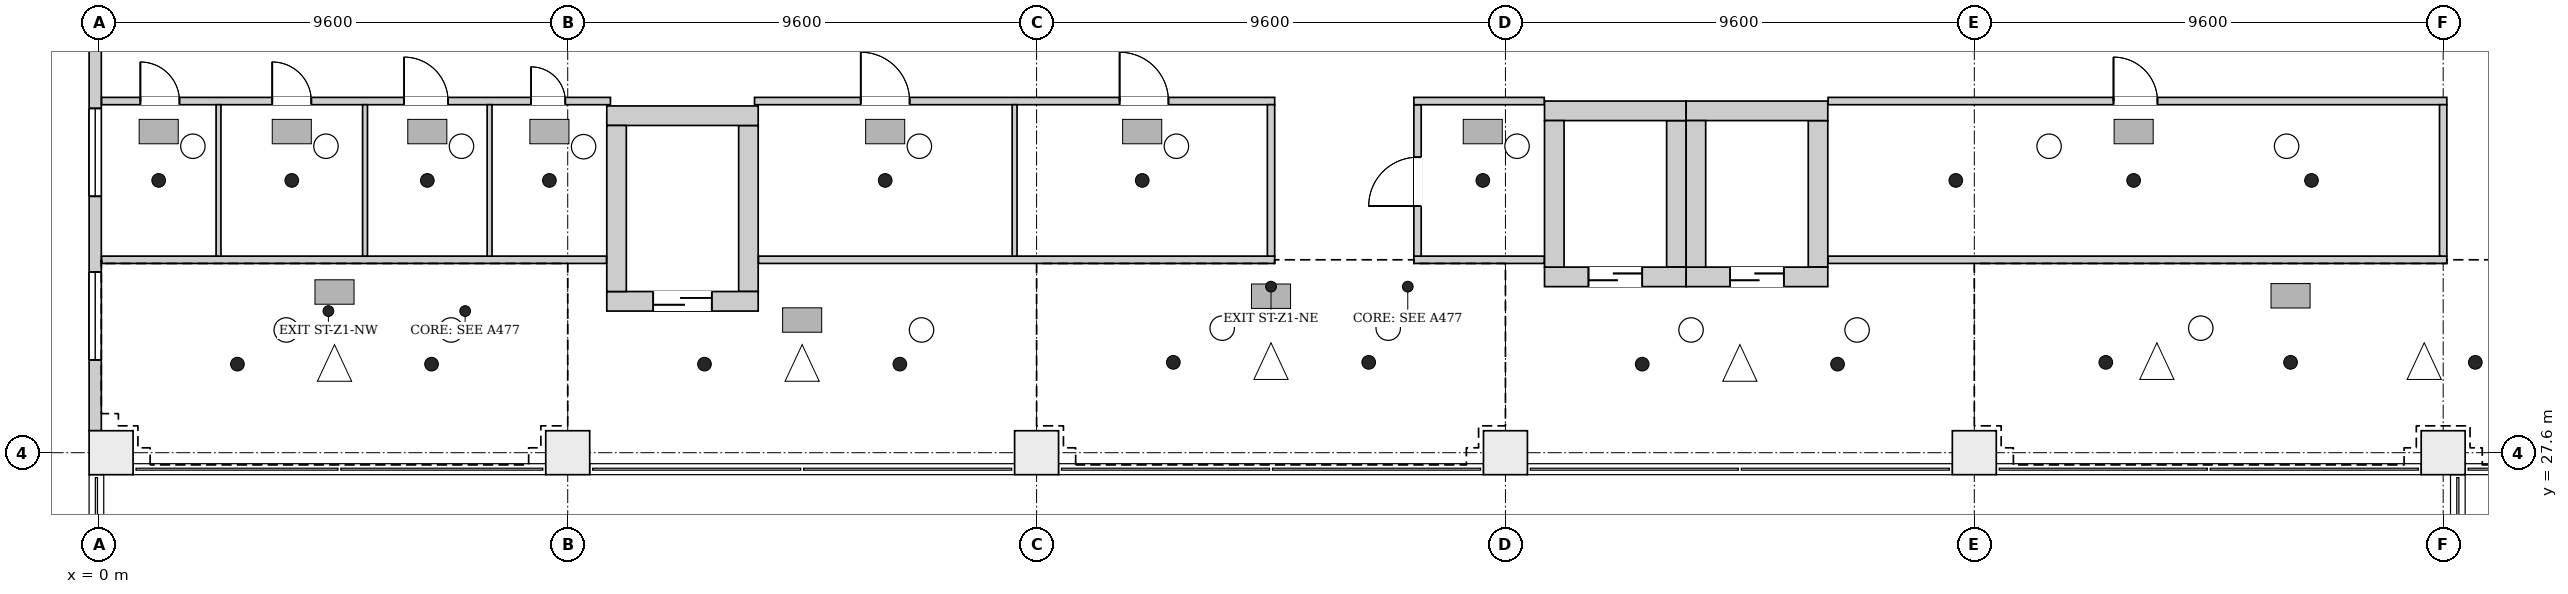
"""IFC4 building model, lengths in metres.
Left out: names, types, materials, properties, quantities, classifications, styles, units other than length and angle.
Written with IfcOpenShell. Run it as: python <this file> out.ifc"""

import sys

from ifc_helpers import new_model, si_unit, direction, frame, frame_2d, origin, origin_2d, place, context, subcontext, project, spatial, rectangle, extrude, element, fill, save


model = new_model("IFC4")
c1 = context("Model", 3, precision=1e-05, world=origin(), true_north=direction((0.0, 1.0)))
c2 = subcontext(c1, "Body", "Model", "MODEL_VIEW")
j1 = project(units=[si_unit("LENGTHUNIT", "METRE"), si_unit("PLANEANGLEUNIT", "RADIAN")], contexts=[c1])
p1 = place(None, origin())
s1 = spatial("IfcSite", under=j1, at=p1, CompositionType="ELEMENT")
p2 = place(p1, origin())
s2 = spatial("IfcBuilding", under=s1, at=p2, CompositionType="ELEMENT")
p3 = place(p2, frame((0.0, 0.0, 52.9)))
s3 = spatial("IfcBuildingStorey", under=s2, at=p3, CompositionType="ELEMENT", Elevation=52.9)
p4 = place(p3, frame((10.4, 30.7, 0.0), z_axis=(0.0, 0.0, 1.0), x_axis=(1.0, 0.0, 0.0)))
e1 = element("IfcWall", 1, at=p4, inside=s3, PredefinedType="SHEAR", context=c2, shape_type="SweptSolid", body=[
    extrude(rectangle(XDim=3.1, YDim=0.4, at=frame_2d((1.55, 0.0))), origin(), (0.0, 0.0, 1.0), 4.2),
])
p5 = place(p4, frame((0.95, 0.0, 0.0)))
e2 = element("IfcOpeningElement", 2, at=p5, cuts=e1, PredefinedType="OPENING", context=c2, shape_type="SweptSolid", body=[
    extrude(rectangle(XDim=1.2, YDim=2.1, at=frame_2d((0.6, 1.05))), frame((0.0, 0.21, 0.0), z_axis=(0.0, -1.0, 0.0), x_axis=(1.0, 0.0, 0.0)), (0.0, 0.0, 1.0), 0.42),
])
p6 = place(p3, frame((10.4, 34.5, 0.0), z_axis=(0.0, 0.0, 1.0), x_axis=(1.0, 0.0, 0.0)))
e3 = element("IfcWall", 3, at=p6, inside=s3, PredefinedType="SHEAR", context=c2, shape_type="SweptSolid", body=[
    extrude(rectangle(XDim=3.1, YDim=0.4, at=frame_2d((1.55, 0.0))), origin(), (0.0, 0.0, 1.0), 4.2),
])
for number, where, z_axis, x_axis in (
    (4, (10.6, 30.9, 0.0), (0.0, 0.0, 1.0), (0.0, 1.0, 0.0)),
    (5, (13.3, 30.9, 0.0), (0.0, 0.0, 1.0), (0.0, 1.0, 0.0)),
):
    element("IfcWall", number, at=place(p3, frame(where, z_axis=z_axis, x_axis=x_axis)), inside=s3, PredefinedType="SHEAR", context=c2, shape_type="SweptSolid", body=[
        extrude(rectangle(XDim=3.4, YDim=0.4, at=frame_2d((1.7, 0.0))), origin(), (0.0, 0.0, 1.0), 4.2),
    ])
p7 = place(p3, frame((29.6, 31.2, 0.0), z_axis=(0.0, 0.0, 1.0), x_axis=(1.0, 0.0, 0.0)))
e6 = element("IfcWall", 6, at=p7, inside=s3, PredefinedType="SHEAR", context=c2, shape_type="SweptSolid", body=[
    extrude(rectangle(XDim=2.9, YDim=0.4, at=frame_2d((1.45, 0.0))), origin(), (0.0, 0.0, 1.0), 4.2),
])
p8 = place(p7, frame((0.9, 0.0, 0.0)))
e7 = element("IfcOpeningElement", 7, at=p8, cuts=e6, PredefinedType="OPENING", context=c2, shape_type="SweptSolid", body=[
    extrude(rectangle(XDim=1.1, YDim=2.1, at=frame_2d((0.55, 1.05))), frame((0.0, 0.21, 0.0), z_axis=(0.0, -1.0, 0.0), x_axis=(1.0, 0.0, 0.0)), (0.0, 0.0, 1.0), 0.42),
])
p9 = place(p3, frame((29.6, 34.6, 0.0), z_axis=(0.0, 0.0, 1.0), x_axis=(1.0, 0.0, 0.0)))
e8 = element("IfcWall", 8, at=p9, inside=s3, PredefinedType="SHEAR", context=c2, shape_type="SweptSolid", body=[
    extrude(rectangle(XDim=2.9, YDim=0.4, at=frame_2d((1.45, 0.0))), origin(), (0.0, 0.0, 1.0), 4.2),
])
for number, where, z_axis, x_axis in (
    (9, (29.8, 31.4, 0.0), (0.0, 0.0, 1.0), (0.0, 1.0, 0.0)),
    (10, (32.3, 31.4, 0.0), (0.0, 0.0, 1.0), (0.0, 1.0, 0.0)),
):
    element("IfcWall", number, at=place(p3, frame(where, z_axis=z_axis, x_axis=x_axis)), inside=s3, PredefinedType="SHEAR", context=c2, shape_type="SweptSolid", body=[
        extrude(rectangle(XDim=3.0, YDim=0.4, at=frame_2d((1.5, 0.0))), origin(), (0.0, 0.0, 1.0), 4.2),
    ])
p10 = place(p3, frame((32.5, 31.2, 0.0), z_axis=(0.0, 0.0, 1.0), x_axis=(1.0, 0.0, 0.0)))
e11 = element("IfcWall", 11, at=p10, inside=s3, PredefinedType="SHEAR", context=c2, shape_type="SweptSolid", body=[
    extrude(rectangle(XDim=2.9, YDim=0.4, at=frame_2d((1.45, 0.0))), origin(), (0.0, 0.0, 1.0), 4.2),
])
p11 = place(p10, frame((0.9, 0.0, 0.0)))
e12 = element("IfcOpeningElement", 12, at=p11, cuts=e11, PredefinedType="OPENING", context=c2, shape_type="SweptSolid", body=[
    extrude(rectangle(XDim=1.1, YDim=2.1, at=frame_2d((0.55, 1.05))), frame((0.0, 0.21, 0.0), z_axis=(0.0, -1.0, 0.0), x_axis=(1.0, 0.0, 0.0)), (0.0, 0.0, 1.0), 0.42),
])
p12 = place(p3, frame((32.5, 34.6, 0.0), z_axis=(0.0, 0.0, 1.0), x_axis=(1.0, 0.0, 0.0)))
e13 = element("IfcWall", 13, at=p12, inside=s3, PredefinedType="SHEAR", context=c2, shape_type="SweptSolid", body=[
    extrude(rectangle(XDim=2.9, YDim=0.4, at=frame_2d((1.45, 0.0))), origin(), (0.0, 0.0, 1.0), 4.2),
])
for number, where, z_axis, x_axis in (
    (14, (32.7, 31.4, 0.0), (0.0, 0.0, 1.0), (0.0, 1.0, 0.0)),
    (15, (35.2, 31.4, 0.0), (0.0, 0.0, 1.0), (0.0, 1.0, 0.0)),
):
    element("IfcWall", number, at=place(p3, frame(where, z_axis=z_axis, x_axis=x_axis)), inside=s3, PredefinedType="SHEAR", context=c2, shape_type="SweptSolid", body=[
        extrude(rectangle(XDim=3.0, YDim=0.4, at=frame_2d((1.5, 0.0))), origin(), (0.0, 0.0, 1.0), 4.2),
    ])
for number, where, z_axis, x_axis in (
    (16, (0.25, 27.6, 0.0), (0.0, 0.0, 1.0), (1.0, 0.0, 0.0)),
    (17, (9.6, 27.6, 0.0), (0.0, 0.0, 1.0), (1.0, 0.0, 0.0)),
    (18, (19.2, 27.6, 0.0), (0.0, 0.0, 1.0), (1.0, 0.0, 0.0)),
    (19, (28.8, 27.6, 0.0), (0.0, 0.0, 1.0), (1.0, 0.0, 0.0)),
    (20, (38.4, 27.6, 0.0), (0.0, 0.0, 1.0), (1.0, 0.0, 0.0)),
    (21, (48.0, 27.6, 0.0), (0.0, 0.0, 1.0), (1.0, 0.0, 0.0)),
):
    element("IfcColumn", number, at=place(p3, frame(where, z_axis=z_axis, x_axis=x_axis)), inside=s3, PredefinedType="COLUMN", context=c2, shape_type="SweptSolid", body=[
        extrude(rectangle(XDim=0.9, YDim=0.9, at=origin_2d()), origin(), (0.0, 0.0, 1.0), 4.2),
    ])
p13 = place(p3, frame((-0.074, 36.35, 0.0), z_axis=(0.0, 0.0, 1.0), x_axis=(0.0, -1.0, 0.0)))
e22 = element("IfcWall", 22, at=p13, inside=s3, PredefinedType="ELEMENTEDWALL", context=c2, shape_type="SweptSolid", body=[
    extrude(rectangle(XDim=8.3, YDim=0.25, at=frame_2d((4.15, 0.0))), origin(), (0.0, 0.0, 1.0), 3.9),
])
p14 = place(p13, frame((5.05, 0.0, 0.9)))
e23 = element("IfcOpeningElement", 23, at=p14, cuts=e22, PredefinedType="OPENING", context=c2, shape_type="SweptSolid", body=[
    extrude(rectangle(XDim=1.8, YDim=2.6, at=frame_2d((0.9, 1.3))), frame((0.0, 0.135, 0.0), z_axis=(0.0, -1.0, 0.0), x_axis=(1.0, 0.0, 0.0)), (0.0, 0.0, 1.0), 0.27),
])
p15 = place(p13, frame((1.7, 0.0, 0.9)))
e24 = element("IfcOpeningElement", 24, at=p15, cuts=e22, PredefinedType="OPENING", context=c2, shape_type="SweptSolid", body=[
    extrude(rectangle(XDim=1.8, YDim=2.6, at=frame_2d((0.9, 1.3))), frame((0.0, 0.135, 0.0), z_axis=(0.0, -1.0, 0.0), x_axis=(1.0, 0.0, 0.0)), (0.0, 0.0, 1.0), 0.27),
])
p16 = place(p3, frame((0.056, 31.55, 0.0), z_axis=(0.0, 0.0, 1.0), x_axis=(1.0, 0.0, 0.0)))
e25 = element("IfcWall", 25, at=p16, inside=s3, PredefinedType="PARTITIONING", context=c2, shape_type="SweptSolid", body=[
    extrude(rectangle(XDim=10.338, YDim=0.15, at=frame_2d((5.169, 0.0))), origin(), (0.0, 0.0, 1.0), 3.9),
])
p17 = place(p3, frame((0.056, 34.8, 0.0), z_axis=(0.0, 0.0, 1.0), x_axis=(1.0, 0.0, 0.0)))
e26 = element("IfcWall", 26, at=p17, inside=s3, PredefinedType="PARTITIONING", context=c2, shape_type="SweptSolid", body=[
    extrude(rectangle(XDim=10.419, YDim=0.15, at=frame_2d((5.209, 0.0))), origin(), (0.0, 0.0, 1.0), 3.9),
])
p18 = place(p17, frame((0.794, 0.0, 0.0)))
e27 = element("IfcOpeningElement", 27, at=p18, cuts=e26, PredefinedType="OPENING", context=c2, shape_type="SweptSolid", body=[
    extrude(rectangle(XDim=0.8, YDim=2.1, at=frame_2d((0.4, 1.05))), frame((0.0, 0.085, 0.0), z_axis=(0.0, -1.0, 0.0), x_axis=(1.0, 0.0, 0.0)), (0.0, 0.0, 1.0), 0.17),
])
p19 = place(p17, frame((3.494, 0.0, 0.0)))
e28 = element("IfcOpeningElement", 28, at=p19, cuts=e26, PredefinedType="OPENING", context=c2, shape_type="SweptSolid", body=[
    extrude(rectangle(XDim=0.8, YDim=2.1, at=frame_2d((0.4, 1.05))), frame((0.0, 0.085, 0.0), z_axis=(0.0, -1.0, 0.0), x_axis=(1.0, 0.0, 0.0)), (0.0, 0.0, 1.0), 0.17),
])
p20 = place(p17, frame((6.194, 0.0, 0.0)))
e29 = element("IfcOpeningElement", 29, at=p20, cuts=e26, PredefinedType="OPENING", context=c2, shape_type="SweptSolid", body=[
    extrude(rectangle(XDim=0.9, YDim=2.1, at=frame_2d((0.45, 1.05))), frame((0.0, 0.085, 0.0), z_axis=(0.0, -1.0, 0.0), x_axis=(1.0, 0.0, 0.0)), (0.0, 0.0, 1.0), 0.17),
])
p21 = place(p17, frame((8.794, 0.0, 0.0)))
e30 = element("IfcOpeningElement", 30, at=p21, cuts=e26, PredefinedType="OPENING", context=c2, shape_type="SweptSolid", body=[
    extrude(rectangle(XDim=0.7, YDim=2.1, at=frame_2d((0.35, 1.05))), frame((0.0, 0.085, 0.0), z_axis=(0.0, -1.0, 0.0), x_axis=(1.0, 0.0, 0.0)), (0.0, 0.0, 1.0), 0.17),
])
for number, where, z_axis, x_axis in (
    (31, (2.45, 31.625, 0.0), (0.0, 0.0, 1.0), (0.0, 1.0, 0.0)),
    (32, (5.45, 31.625, 0.0), (0.0, 0.0, 1.0), (0.0, 1.0, 0.0)),
    (33, (8.0, 31.625, 0.0), (0.0, 0.0, 1.0), (0.0, 1.0, 0.0)),
):
    element("IfcWall", number, at=place(p3, frame(where, z_axis=z_axis, x_axis=x_axis)), inside=s3, PredefinedType="PARTITIONING", context=c2, shape_type="SweptSolid", body=[
        extrude(rectangle(XDim=3.1, YDim=0.1, at=frame_2d((1.55, 0.0))), origin(), (0.0, 0.0, 1.0), 3.9),
    ])
p22 = place(p3, frame((13.425, 34.8, 0.0), z_axis=(0.0, 0.0, 1.0), x_axis=(1.0, 0.0, 0.0)))
e34 = element("IfcWall", 34, at=p22, inside=s3, PredefinedType="PARTITIONING", context=c2, shape_type="SweptSolid", body=[
    extrude(rectangle(XDim=10.65, YDim=0.15, at=frame_2d((5.325, 0.0))), origin(), (0.0, 0.0, 1.0), 3.9),
])
p23 = place(p22, frame((2.175, 0.0, 0.0)))
e35 = element("IfcOpeningElement", 35, at=p23, cuts=e34, PredefinedType="OPENING", context=c2, shape_type="SweptSolid", body=[
    extrude(rectangle(XDim=1.0, YDim=2.1, at=frame_2d((0.5, 1.05))), frame((0.0, 0.085, 0.0), z_axis=(0.0, -1.0, 0.0), x_axis=(1.0, 0.0, 0.0)), (0.0, 0.0, 1.0), 0.17),
])
p24 = place(p22, frame((7.475, 0.0, 0.0)))
e36 = element("IfcOpeningElement", 36, at=p24, cuts=e34, PredefinedType="OPENING", context=c2, shape_type="SweptSolid", body=[
    extrude(rectangle(XDim=1.0, YDim=2.1, at=frame_2d((0.5, 1.05))), frame((0.0, 0.085, 0.0), z_axis=(0.0, -1.0, 0.0), x_axis=(1.0, 0.0, 0.0)), (0.0, 0.0, 1.0), 0.17),
])
p25 = place(p3, frame((13.506, 31.55, 0.0), z_axis=(0.0, 0.0, 1.0), x_axis=(1.0, 0.0, 0.0)))
e37 = element("IfcWall", 37, at=p25, inside=s3, PredefinedType="PARTITIONING", context=c2, shape_type="SweptSolid", body=[
    extrude(rectangle(XDim=10.569, YDim=0.15, at=frame_2d((5.284, 0.0))), origin(), (0.0, 0.0, 1.0), 3.9),
])
p26 = place(p3, frame((18.75, 31.625, 0.0), z_axis=(0.0, 0.0, 1.0), x_axis=(0.0, 1.0, 0.0)))
e38 = element("IfcWall", 38, at=p26, inside=s3, PredefinedType="PARTITIONING", context=c2, shape_type="SweptSolid", body=[
    extrude(rectangle(XDim=3.1, YDim=0.1, at=frame_2d((1.55, 0.0))), origin(), (0.0, 0.0, 1.0), 3.9),
])
p27 = place(p3, frame((24.0, 31.625, 0.0), z_axis=(0.0, 0.0, 1.0), x_axis=(0.0, 1.0, 0.0)))
e39 = element("IfcWall", 39, at=p27, inside=s3, PredefinedType="PARTITIONING", context=c2, shape_type="SweptSolid", body=[
    extrude(rectangle(XDim=3.1, YDim=0.15, at=frame_2d((1.55, 0.0))), origin(), (0.0, 0.0, 1.0), 3.9),
])
p28 = place(p3, frame((26.925, 31.55, 0.0), z_axis=(0.0, 0.0, 1.0), x_axis=(1.0, 0.0, 0.0)))
e40 = element("IfcWall", 40, at=p28, inside=s3, PredefinedType="PARTITIONING", context=c2, shape_type="SweptSolid", body=[
    extrude(rectangle(XDim=2.669, YDim=0.15, at=frame_2d((1.334, 0.0))), origin(), (0.0, 0.0, 1.0), 3.9),
])
p29 = place(p3, frame((27.0, 31.625, 0.0), z_axis=(0.0, 0.0, 1.0), x_axis=(0.0, 1.0, 0.0)))
e41 = element("IfcWall", 41, at=p29, inside=s3, PredefinedType="PARTITIONING", context=c2, shape_type="SweptSolid", body=[
    extrude(rectangle(XDim=3.1, YDim=0.15, at=frame_2d((1.55, 0.0))), origin(), (0.0, 0.0, 1.0), 3.9),
])
p30 = place(p29, frame((1.025, 0.0, 0.0)))
e42 = element("IfcOpeningElement", 42, at=p30, cuts=e41, PredefinedType="OPENING", context=c2, shape_type="SweptSolid", body=[
    extrude(rectangle(XDim=1.0, YDim=2.1, at=frame_2d((0.5, 1.05))), frame((0.0, 0.085, 0.0), z_axis=(0.0, -1.0, 0.0), x_axis=(1.0, 0.0, 0.0)), (0.0, 0.0, 1.0), 0.17),
])
p31 = place(p3, frame((26.925, 34.8, 0.0), z_axis=(0.0, 0.0, 1.0), x_axis=(1.0, 0.0, 0.0)))
e43 = element("IfcWall", 43, at=p31, inside=s3, PredefinedType="PARTITIONING", context=c2, shape_type="SweptSolid", body=[
    extrude(rectangle(XDim=2.669, YDim=0.15, at=frame_2d((1.334, 0.0))), origin(), (0.0, 0.0, 1.0), 3.9),
])
p32 = place(p3, frame((35.406, 31.55, 0.0), z_axis=(0.0, 0.0, 1.0), x_axis=(1.0, 0.0, 0.0)))
e44 = element("IfcWall", 44, at=p32, inside=s3, PredefinedType="PARTITIONING", context=c2, shape_type="SweptSolid", body=[
    extrude(rectangle(XDim=12.669, YDim=0.15, at=frame_2d((6.334, 0.0))), origin(), (0.0, 0.0, 1.0), 3.9),
])
p33 = place(p3, frame((35.406, 34.8, 0.0), z_axis=(0.0, 0.0, 1.0), x_axis=(1.0, 0.0, 0.0)))
e45 = element("IfcWall", 45, at=p33, inside=s3, PredefinedType="PARTITIONING", context=c2, shape_type="SweptSolid", body=[
    extrude(rectangle(XDim=12.669, YDim=0.15, at=frame_2d((6.334, 0.0))), origin(), (0.0, 0.0, 1.0), 3.9),
])
p34 = place(p33, frame((5.844, 0.0, 0.0)))
e46 = element("IfcOpeningElement", 46, at=p34, cuts=e45, PredefinedType="OPENING", context=c2, shape_type="SweptSolid", body=[
    extrude(rectangle(XDim=0.9, YDim=2.1, at=frame_2d((0.45, 1.05))), frame((0.0, 0.085, 0.0), z_axis=(0.0, -1.0, 0.0), x_axis=(1.0, 0.0, 0.0)), (0.0, 0.0, 1.0), 0.17),
])
p35 = place(p3, frame((48.0, 31.625, 0.0), z_axis=(0.0, 0.0, 1.0), x_axis=(0.0, 1.0, 0.0)))
e47 = element("IfcWall", 47, at=p35, inside=s3, PredefinedType="PARTITIONING", context=c2, shape_type="SweptSolid", body=[
    extrude(rectangle(XDim=3.1, YDim=0.15, at=frame_2d((1.55, 0.0))), origin(), (0.0, 0.0, 1.0), 3.3),
])
p36 = place(p14, origin())
e48 = element("IfcWindow", 48, at=p36, inside=s3, PartitioningType="SINGLE_PANEL", PredefinedType="WINDOW", context=c2, shape_type="SweptSolid", body=[
    extrude(rectangle(XDim=1.8, YDim=2.6, at=frame_2d((0.9, 1.3))), frame((0.0, 0.03, 0.0), z_axis=(0.0, -1.0, 0.0), x_axis=(1.0, 0.0, 0.0)), (0.0, 0.0, 1.0), 0.06),
])
fill(e23, e48)
p37 = place(p15, origin())
e49 = element("IfcWindow", 49, at=p37, inside=s3, PartitioningType="SINGLE_PANEL", PredefinedType="WINDOW", context=c2, shape_type="SweptSolid", body=[
    extrude(rectangle(XDim=1.8, YDim=2.6, at=frame_2d((0.9, 1.3))), frame((0.0, 0.03, 0.0), z_axis=(0.0, -1.0, 0.0), x_axis=(1.0, 0.0, 0.0)), (0.0, 0.0, 1.0), 0.06),
])
fill(e24, e49)
p38 = place(p5, origin())
e50 = element("IfcDoor", 50, at=p38, inside=s3, OperationType="DOUBLE_DOOR_SLIDING", PredefinedType="DOOR", context=c2, shape_type="SweptSolid", body=[
    extrude(rectangle(XDim=1.2, YDim=2.1, at=frame_2d((0.6, 1.05))), frame((0.0, 0.025, 0.0), z_axis=(0.0, -1.0, 0.0), x_axis=(1.0, 0.0, 0.0)), (0.0, 0.0, 1.0), 0.05),
])
fill(e2, e50)
p39 = place(p8, origin())
e51 = element("IfcDoor", 51, at=p39, inside=s3, OperationType="DOUBLE_DOOR_SLIDING", PredefinedType="DOOR", context=c2, shape_type="SweptSolid", body=[
    extrude(rectangle(XDim=1.1, YDim=2.1, at=frame_2d((0.55, 1.05))), frame((0.0, 0.025, 0.0), z_axis=(0.0, -1.0, 0.0), x_axis=(1.0, 0.0, 0.0)), (0.0, 0.0, 1.0), 0.05),
])
fill(e7, e51)
p40 = place(p11, origin())
e52 = element("IfcDoor", 52, at=p40, inside=s3, OperationType="DOUBLE_DOOR_SLIDING", PredefinedType="DOOR", context=c2, shape_type="SweptSolid", body=[
    extrude(rectangle(XDim=1.1, YDim=2.1, at=frame_2d((0.55, 1.05))), frame((0.0, 0.025, 0.0), z_axis=(0.0, -1.0, 0.0), x_axis=(1.0, 0.0, 0.0)), (0.0, 0.0, 1.0), 0.05),
])
fill(e12, e52)
p41 = place(p18, origin())
e53 = element("IfcDoor", 53, at=p41, inside=s3, OperationType="SINGLE_SWING_RIGHT", PredefinedType="DOOR", context=c2, shape_type="SweptSolid", body=[
    extrude(rectangle(XDim=0.8, YDim=2.1, at=frame_2d((0.4, 1.05))), frame((0.0, 0.025, 0.0), z_axis=(0.0, -1.0, 0.0), x_axis=(1.0, 0.0, 0.0)), (0.0, 0.0, 1.0), 0.05),
])
fill(e27, e53)
p42 = place(p19, origin())
e54 = element("IfcDoor", 54, at=p42, inside=s3, OperationType="SINGLE_SWING_LEFT", PredefinedType="DOOR", context=c2, shape_type="SweptSolid", body=[
    extrude(rectangle(XDim=0.8, YDim=2.1, at=frame_2d((0.4, 1.05))), frame((0.0, 0.025, 0.0), z_axis=(0.0, -1.0, 0.0), x_axis=(1.0, 0.0, 0.0)), (0.0, 0.0, 1.0), 0.05),
])
fill(e28, e54)
p43 = place(p20, origin())
e55 = element("IfcDoor", 55, at=p43, inside=s3, OperationType="SINGLE_SWING_LEFT", PredefinedType="DOOR", context=c2, shape_type="SweptSolid", body=[
    extrude(rectangle(XDim=0.9, YDim=2.1, at=frame_2d((0.45, 1.05))), frame((0.0, 0.025, 0.0), z_axis=(0.0, -1.0, 0.0), x_axis=(1.0, 0.0, 0.0)), (0.0, 0.0, 1.0), 0.05),
])
fill(e29, e55)
p44 = place(p21, origin())
e56 = element("IfcDoor", 56, at=p44, inside=s3, OperationType="SINGLE_SWING_LEFT", PredefinedType="DOOR", context=c2, shape_type="SweptSolid", body=[
    extrude(rectangle(XDim=0.7, YDim=2.1, at=frame_2d((0.35, 1.05))), frame((0.0, 0.025, 0.0), z_axis=(0.0, -1.0, 0.0), x_axis=(1.0, 0.0, 0.0)), (0.0, 0.0, 1.0), 0.05),
])
fill(e30, e56)
p45 = place(p23, origin())
e57 = element("IfcDoor", 57, at=p45, inside=s3, OperationType="SINGLE_SWING_RIGHT", PredefinedType="DOOR", context=c2, shape_type="SweptSolid", body=[
    extrude(rectangle(XDim=1.0, YDim=2.1, at=frame_2d((0.5, 1.05))), frame((0.0, 0.025, 0.0), z_axis=(0.0, -1.0, 0.0), x_axis=(1.0, 0.0, 0.0)), (0.0, 0.0, 1.0), 0.05),
])
fill(e35, e57)
p46 = place(p24, origin())
e58 = element("IfcDoor", 58, at=p46, inside=s3, OperationType="SINGLE_SWING_RIGHT", PredefinedType="DOOR", context=c2, shape_type="SweptSolid", body=[
    extrude(rectangle(XDim=1.0, YDim=2.1, at=frame_2d((0.5, 1.05))), frame((0.0, 0.025, 0.0), z_axis=(0.0, -1.0, 0.0), x_axis=(1.0, 0.0, 0.0)), (0.0, 0.0, 1.0), 0.05),
])
fill(e36, e58)
p47 = place(p30, origin())
e59 = element("IfcDoor", 59, at=p47, inside=s3, OperationType="SINGLE_SWING_LEFT", PredefinedType="DOOR", context=c2, shape_type="SweptSolid", body=[
    extrude(rectangle(XDim=1.0, YDim=2.1, at=frame_2d((0.5, 1.05))), frame((0.0, 0.025, 0.0), z_axis=(0.0, -1.0, 0.0), x_axis=(1.0, 0.0, 0.0)), (0.0, 0.0, 1.0), 0.05),
])
fill(e42, e59)
p48 = place(p34, origin())
e60 = element("IfcDoor", 60, at=p48, inside=s3, OperationType="SINGLE_SWING_RIGHT", PredefinedType="DOOR", context=c2, shape_type="SweptSolid", body=[
    extrude(rectangle(XDim=0.9, YDim=2.1, at=frame_2d((0.45, 1.05))), frame((0.0, 0.025, 0.0), z_axis=(0.0, -1.0, 0.0), x_axis=(1.0, 0.0, 0.0)), (0.0, 0.0, 1.0), 0.05),
])
fill(e46, e60)
save(model, sys.argv[1])
